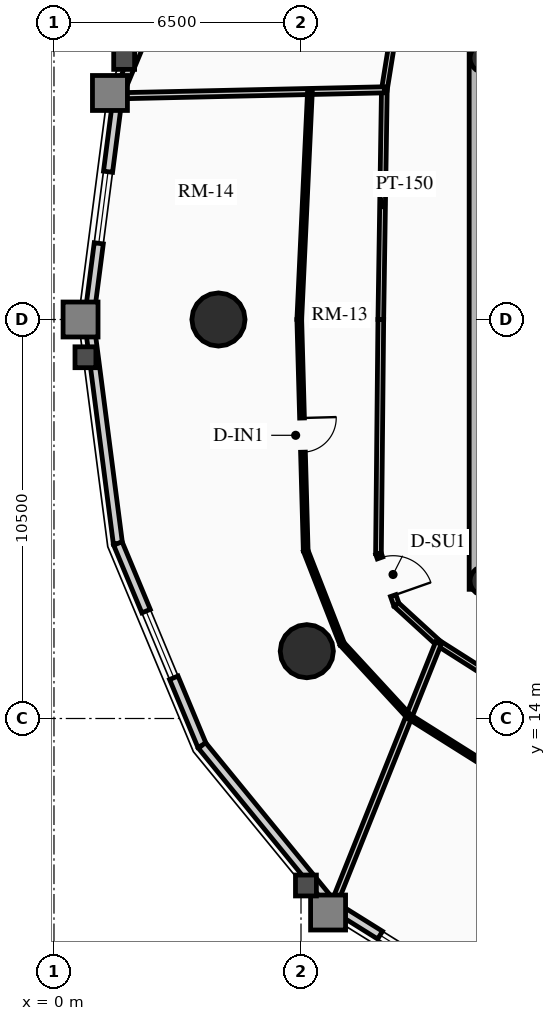
"""IFC4 building model, lengths in metres.
Left out: names, types, materials, properties, quantities, classifications, styles, units other than length and angle.
Written with IfcOpenShell. Run it as: python <this file> out.ifc"""

import sys

from ifc_helpers import new_model, si_unit, direction, frame, frame_2d, origin, origin_2d, place, context, subcontext, project, spatial, rectangle, circle, hollow_circle, extrude, source, transform, mapped, element, fill, save


model = new_model("IFC4")
c1 = context("Model", 3, precision=1e-05, world=origin(), true_north=direction((0.0, 1.0)))
c2 = subcontext(c1, "Body", "Model", "MODEL_VIEW")
j1 = project(units=[si_unit("LENGTHUNIT", "METRE"), si_unit("PLANEANGLEUNIT", "RADIAN")], contexts=[c1])
p1 = place(None, origin())
s1 = spatial("IfcSite", under=j1, at=p1, CompositionType="ELEMENT")
p2 = place(p1, origin())
s2 = spatial("IfcBuilding", under=s1, at=p2, CompositionType="ELEMENT")
p3 = place(p2, frame((0.0, 0.0, 110.89)))
s3 = spatial("IfcBuildingStorey", under=s2, at=p3, CompositionType="ELEMENT", Elevation=110.89)
p4 = place(p3, frame((11.15, 17.4, 0.0), z_axis=(0.0, 0.0, 1.0), x_axis=(0.0, 1.0, 0.0)))
e1 = element("IfcWall", 1, at=p4, inside=s3, PredefinedType="SHEAR", context=c2, shape_type="SweptSolid", body=[
    extrude(rectangle(XDim=14.2, YDim=0.45, at=frame_2d((7.1, 0.0))), origin(), (0.0, 0.0, 1.0), 2.91),
])
for number, where, z_axis, x_axis in (
    (2, (11.325, 17.62, 0.0), (0.0, 0.0, 1.0), (1.0, 0.0, 0.0)),
    (3, (11.325, 31.38, 0.0), (0.0, 0.0, 1.0), (1.0, 0.0, 0.0)),
):
    element("IfcColumn", number, at=place(p3, frame(where, z_axis=z_axis, x_axis=x_axis)), inside=s3, PredefinedType="COLUMN", context=c2, shape_type="SweptSolid", body=[
        extrude(hollow_circle(Radius=0.38, WallThickness=0.032, at=origin_2d()), origin(), (0.0, 0.0, 1.0), 2.91),
    ])
for number, where, z_axis, x_axis in (
    (4, (4.328, 24.5, 0.0), (0.0, 0.0, 1.0), (1.0, 0.0, 0.0)),
    (5, (6.653, 15.771, 0.0), (0.0, 0.0, 1.0), (1.0, 0.0, 0.0)),
):
    element("IfcColumn", number, at=place(p3, frame(where, z_axis=z_axis, x_axis=x_axis)), inside=s3, PredefinedType="USERDEFINED", context=c2, shape_type="SweptSolid", body=[
        extrude(circle(Radius=0.7, at=origin_2d()), origin(), (0.0, 0.0, 1.0), 2.91),
    ])
p5 = place(p3, frame((1.682, 30.393, 0.0), z_axis=(0.0, 0.0, 1.0), x_axis=(0.384344417632, 0.923189779317, 0.0)))
e6 = element("IfcWall", 6, at=p5, inside=s3, PredefinedType="SOLIDWALL", context=c2, shape_type="SweptSolid", body=[
    extrude(rectangle(XDim=5.758, YDim=0.24, at=frame_2d((2.879, 0.0))), origin(), (0.0, 0.0, 1.0), 2.179),
])
p6 = place(p3, frame((0.919, 24.5, 0.0), z_axis=(0.0, 0.0, 1.0), x_axis=(0.128351991996, 0.991728675672, 0.0)))
e7 = element("IfcWall", 7, at=p6, inside=s3, PredefinedType="SOLIDWALL", context=c2, shape_type="SweptSolid", body=[
    extrude(rectangle(XDim=5.942, YDim=0.24, at=frame_2d((2.971, 0.0))), origin(), (0.0, 0.0, 1.0), 2.179),
])
m1 = source(origin(), c2, "Body", "SweptSolid", [
    extrude(rectangle(XDim=1.9, YDim=1.35, at=frame_2d((0.95, 0.675))), frame((0.0, 0.13, 0.0), z_axis=(0.0, -1.0, 0.0), x_axis=(1.0, 0.0, 0.0)), (0.0, 0.0, 1.0), 0.26),
])
p7 = place(p6, frame((2.021, 0.0, 0.65)))
e8 = element("IfcOpeningElement", 8, at=p7, cuts=e7, PredefinedType="OPENING", context=c2, shape_type="MappedRepresentation", body=[
    mapped(m1, transform((0.0, 0.0, 0.0), x_axis=(1.0, 0.0, 0.0), y_axis=(0.0, 1.0, 0.0), z_axis=(0.0, 0.0, 1.0), scale=1.0)),
])
p8 = place(p3, frame((1.682, 18.607, 0.0), z_axis=(0.0, 0.0, 1.0), x_axis=(-0.128351991996, 0.991728675672, 0.0)))
e9 = element("IfcWall", 9, at=p8, inside=s3, PredefinedType="SOLIDWALL", context=c2, shape_type="SweptSolid", body=[
    extrude(rectangle(XDim=5.942, YDim=0.24, at=frame_2d((2.971, 0.0))), origin(), (0.0, 0.0, 1.0), 2.179),
])
p9 = place(p3, frame((3.895, 13.291, 0.0), z_axis=(0.0, 0.0, 1.0), x_axis=(-0.384344417632, 0.923189779317, 0.0)))
e10 = element("IfcWall", 10, at=p9, inside=s3, PredefinedType="SOLIDWALL", context=c2, shape_type="SweptSolid", body=[
    extrude(rectangle(XDim=5.758, YDim=0.24, at=frame_2d((2.879, 0.0))), origin(), (0.0, 0.0, 1.0), 2.179),
])
p10 = place(p9, frame((1.929, 0.0, 0.65)))
e11 = element("IfcOpeningElement", 11, at=p10, cuts=e10, PredefinedType="OPENING", context=c2, shape_type="MappedRepresentation", body=[
    mapped(m1, transform((0.0, 0.0, 0.0), x_axis=(1.0, 0.0, 0.0), y_axis=(0.0, 1.0, 0.0), z_axis=(0.0, 0.0, 1.0), scale=1.0)),
])
p11 = place(p3, frame((7.342, 9.072, 0.0), z_axis=(0.0, 0.0, 1.0), x_axis=(-0.632700781152, 0.77439635945, 0.0)))
e12 = element("IfcWall", 12, at=p11, inside=s3, PredefinedType="SOLIDWALL", context=c2, shape_type="SweptSolid", body=[
    extrude(rectangle(XDim=5.448, YDim=0.24, at=frame_2d((2.724, 0.0))), origin(), (0.0, 0.0, 1.0), 2.179),
])
p12 = place(p3, frame((11.685, 6.363, 0.0), z_axis=(0.0, 0.0, 1.0), x_axis=(-0.848520380187, 0.529162701263, 0.0)))
e13 = element("IfcWall", 13, at=p12, inside=s3, PredefinedType="SOLIDWALL", context=c2, shape_type="SweptSolid", body=[
    extrude(rectangle(XDim=5.119, YDim=0.24, at=frame_2d((2.56, 0.0))), origin(), (0.0, 0.0, 1.0), 2.179),
])
m2 = source(origin(), c2, "Body", "SweptSolid", [
    extrude(rectangle(XDim=2.2, YDim=1.35, at=frame_2d((1.1, 0.675))), frame((0.0, 0.13, 0.0), z_axis=(0.0, -1.0, 0.0), x_axis=(1.0, 0.0, 0.0)), (0.0, 0.0, 1.0), 0.26),
])
p13 = place(p12, frame((1.459, 0.0, 0.65)))
e14 = element("IfcOpeningElement", 14, at=p13, cuts=e13, PredefinedType="OPENING", context=c2, shape_type="MappedRepresentation", body=[
    mapped(m2, transform((0.0, 0.0, 0.0), x_axis=(1.0, 0.0, 0.0), y_axis=(0.0, 1.0, 0.0), z_axis=(0.0, 0.0, 1.0), scale=1.0)),
])
p14 = place(p3, frame((8.94, 32.078, 0.0), z_axis=(0.0, 0.0, 1.0), x_axis=(-0.159148467753, -0.98725466077, 0.0)))
e15 = element("IfcWall", 15, at=p14, inside=s3, PredefinedType="PARTITIONING", context=c2, shape_type="SweptSolid", body=[
    extrude(rectangle(XDim=1.554, YDim=0.15, at=frame_2d((0.777, 0.0))), origin(), (0.0, 0.0, 1.0), 2.225),
])
p15 = place(p3, frame((8.693, 30.544, 0.0), z_axis=(0.0, 0.0, 1.0), x_axis=(-0.015307007986, -0.99988284089, 0.0)))
e16 = element("IfcWall", 16, at=p15, inside=s3, PredefinedType="PARTITIONING", context=c2, shape_type="SweptSolid", body=[
    extrude(rectangle(XDim=6.045, YDim=0.15, at=frame_2d((3.022, 0.0))), origin(), (0.0, 0.0, 1.0), 2.655),
])
p16 = place(p3, frame((8.6, 24.5, 0.0), z_axis=(0.0, 0.0, 1.0), x_axis=(-0.010023665349, -0.999949761805, 0.0)))
e17 = element("IfcWall", 17, at=p16, inside=s3, PredefinedType="PARTITIONING", context=c2, shape_type="SweptSolid", body=[
    extrude(rectangle(XDim=6.162, YDim=0.15, at=frame_2d((3.081, 0.0))), origin(), (0.0, 0.0, 1.0), 2.225),
])
p17 = place(p3, frame((8.538, 18.338, 0.0), z_axis=(0.0, 0.0, 1.0), x_axis=(0.331358150167, -0.94350504838, 0.0)))
e18 = element("IfcWall", 18, at=p17, inside=s3, PredefinedType="PARTITIONING", context=c2, shape_type="SweptSolid", body=[
    extrude(rectangle(XDim=1.424, YDim=0.15, at=frame_2d((0.712, 0.0))), origin(), (0.0, 0.0, 1.0), 2.225),
])
m3 = source(origin(), c2, "Body", "SweptSolid", [
    extrude(rectangle(XDim=1.05, YDim=2.015, at=frame_2d((0.525, 1.007))), frame((0.0, 0.085, 0.0), z_axis=(0.0, -1.0, 0.0), x_axis=(1.0, 0.0, 0.0)), (0.0, 0.0, 1.0), 0.17),
])
p18 = place(p17, frame((0.12, 0.0, 0.0)))
e19 = element("IfcOpeningElement", 19, at=p18, cuts=e18, PredefinedType="OPENING", context=c2, shape_type="MappedRepresentation", body=[
    mapped(m3, transform((0.0, 0.0, 0.0), x_axis=(1.0, 0.0, 0.0), y_axis=(0.0, 1.0, 0.0), z_axis=(0.0, 0.0, 1.0), scale=1.0)),
])
p19 = place(p3, frame((9.01, 16.994, 0.0), z_axis=(0.0, 0.0, 1.0), x_axis=(0.737701798986, -0.67512669609, 0.0)))
e20 = element("IfcWall", 20, at=p19, inside=s3, PredefinedType="PARTITIONING", context=c2, shape_type="SweptSolid", body=[
    extrude(rectangle(XDim=1.498, YDim=0.15, at=frame_2d((0.749, 0.0))), origin(), (0.0, 0.0, 1.0), 2.225),
])
p20 = place(p3, frame((10.115, 15.983, 0.0), z_axis=(0.0, 0.0, 1.0), x_axis=(0.843995849351, -0.536349705209, 0.0)))
e21 = element("IfcWall", 21, at=p20, inside=s3, PredefinedType="PARTITIONING", context=c2, shape_type="SweptSolid", body=[
    extrude(rectangle(XDim=1.593, YDim=0.15, at=frame_2d((0.796, 0.0))), origin(), (0.0, 0.0, 1.0), 2.225),
])
p21 = place(p3, frame((8.693, 30.544, 0.0), z_axis=(0.0, 0.0, 1.0), x_axis=(-0.999746482141, -0.022516026432, 0.0)))
e22 = element("IfcWall", 22, at=p21, inside=s3, PredefinedType="PARTITIONING", context=c2, shape_type="SweptSolid", body=[
    extrude(rectangle(XDim=6.994, YDim=0.16, at=frame_2d((3.497, 0.0))), origin(), (0.0, 0.0, 1.0), 2.179),
])
p22 = place(p3, frame((10.115, 15.983, 0.0), z_axis=(0.0, 0.0, 1.0), x_axis=(-0.371861013147, -0.928288417951, 0.0)))
e23 = element("IfcWall", 23, at=p22, inside=s3, PredefinedType="PARTITIONING", context=c2, shape_type="SweptSolid", body=[
    extrude(rectangle(XDim=7.427, YDim=0.16, at=frame_2d((3.714, 0.0))), origin(), (0.0, 0.0, 1.0), 2.179),
])
p23 = place(p3, frame((6.735, 30.5, 0.0), z_axis=(0.0, 0.0, 1.0), x_axis=(-0.046620801603, -0.998912659274, 0.0)))
e24 = element("IfcWall", 24, at=p23, inside=s3, PredefinedType="PARTITIONING", context=c2, shape_type="SweptSolid", body=[
    extrude(rectangle(XDim=6.007, YDim=0.125, at=frame_2d((3.003, 0.0))), origin(), (0.0, 0.0, 1.0), 2.655),
])
p24 = place(p3, frame((6.455, 24.5, 0.0), z_axis=(0.0, 0.0, 1.0), x_axis=(0.027753708707, -0.999614791634, 0.0)))
e25 = element("IfcWall", 25, at=p24, inside=s3, PredefinedType="PARTITIONING", context=c2, shape_type="SweptSolid", body=[
    extrude(rectangle(XDim=6.087, YDim=0.125, at=frame_2d((3.044, 0.0))), origin(), (0.0, 0.0, 1.0), 2.225),
])
m4 = source(origin(), c2, "Body", "SweptSolid", [
    extrude(rectangle(XDim=0.9, YDim=2.005, at=frame_2d((0.45, 1.002))), frame((0.0, 0.073, 0.0), z_axis=(0.0, -1.0, 0.0), x_axis=(1.0, 0.0, 0.0)), (0.0, 0.0, 1.0), 0.145),
])
p25 = place(p24, frame((2.594, 0.0, 0.0)))
e26 = element("IfcOpeningElement", 26, at=p25, cuts=e25, PredefinedType="OPENING", context=c2, shape_type="MappedRepresentation", body=[
    mapped(m4, transform((0.0, 0.0, 0.0), x_axis=(1.0, 0.0, 0.0), y_axis=(0.0, 1.0, 0.0), z_axis=(0.0, 0.0, 1.0), scale=1.0)),
])
p26 = place(p3, frame((6.624, 18.415, 0.0), z_axis=(0.0, 0.0, 1.0), x_axis=(0.363854295337, -0.931455877519, 0.0)))
e27 = element("IfcWall", 27, at=p26, inside=s3, PredefinedType="PARTITIONING", context=c2, shape_type="SweptSolid", body=[
    extrude(rectangle(XDim=2.635, YDim=0.125, at=frame_2d((1.317, 0.0))), origin(), (0.0, 0.0, 1.0), 2.225),
])
p27 = place(p3, frame((7.583, 15.961, 0.0), z_axis=(0.0, 0.0, 1.0), x_axis=(0.677838563189, -0.735210774032, 0.0)))
e28 = element("IfcWall", 28, at=p27, inside=s3, PredefinedType="PARTITIONING", context=c2, shape_type="SweptSolid", body=[
    extrude(rectangle(XDim=2.596, YDim=0.125, at=frame_2d((1.298, 0.0))), origin(), (0.0, 0.0, 1.0), 2.655),
])
p28 = place(p3, frame((9.342, 14.052, 0.0), z_axis=(0.0, 0.0, 1.0), x_axis=(0.846526826244, -0.532346064557, 0.0)))
e29 = element("IfcWall", 29, at=p28, inside=s3, PredefinedType="PARTITIONING", context=c2, shape_type="SweptSolid", body=[
    extrude(rectangle(XDim=2.578, YDim=0.125, at=frame_2d((1.289, 0.0))), origin(), (0.0, 0.0, 1.0), 2.225),
])
m5 = source(origin(), c2, "Body", "SweptSolid", [
    extrude(rectangle(XDim=1.9, YDim=1.35, at=frame_2d((0.95, 0.675))), frame((0.0, 0.03, 0.0), z_axis=(0.0, -1.0, 0.0), x_axis=(1.0, 0.0, 0.0)), (0.0, 0.0, 1.0), 0.06),
])
p29 = place(p7, origin())
e30 = element("IfcWindow", 30, at=p29, inside=s3, PartitioningType="DOUBLE_PANEL_VERTICAL", PredefinedType="WINDOW", context=c2, shape_type="MappedRepresentation", body=[
    mapped(m5, transform((0.0, 0.0, 0.0), x_axis=(1.0, 0.0, 0.0), y_axis=(0.0, 1.0, 0.0), z_axis=(0.0, 0.0, 1.0), scale=1.0)),
])
fill(e8, e30)
p30 = place(p10, origin())
e31 = element("IfcWindow", 31, at=p30, inside=s3, PartitioningType="DOUBLE_PANEL_VERTICAL", PredefinedType="WINDOW", context=c2, shape_type="MappedRepresentation", body=[
    mapped(m5, transform((0.0, 0.0, 0.0), x_axis=(1.0, 0.0, 0.0), y_axis=(0.0, 1.0, 0.0), z_axis=(0.0, 0.0, 1.0), scale=1.0)),
])
fill(e11, e31)
m6 = source(origin(), c2, "Body", "SweptSolid", [
    extrude(rectangle(XDim=2.2, YDim=1.35, at=frame_2d((1.1, 0.675))), frame((0.0, 0.03, 0.0), z_axis=(0.0, -1.0, 0.0), x_axis=(1.0, 0.0, 0.0)), (0.0, 0.0, 1.0), 0.06),
])
p31 = place(p13, origin())
e32 = element("IfcWindow", 32, at=p31, inside=s3, PartitioningType="DOUBLE_PANEL_VERTICAL", PredefinedType="WINDOW", context=c2, shape_type="MappedRepresentation", body=[
    mapped(m6, transform((0.0, 0.0, 0.0), x_axis=(1.0, 0.0, 0.0), y_axis=(0.0, 1.0, 0.0), z_axis=(0.0, 0.0, 1.0), scale=1.0)),
])
fill(e14, e32)
m7 = source(origin(), c2, "Body", "SweptSolid", [
    extrude(rectangle(XDim=1.05, YDim=2.015, at=frame_2d((0.525, 1.007))), frame((0.0, 0.025, 0.0), z_axis=(0.0, -1.0, 0.0), x_axis=(1.0, 0.0, 0.0)), (0.0, 0.0, 1.0), 0.05),
])
p32 = place(p18, origin())
e33 = element("IfcDoor", 33, at=p32, inside=s3, OperationType="SINGLE_SWING_RIGHT", PredefinedType="DOOR", context=c2, shape_type="MappedRepresentation", body=[
    mapped(m7, transform((0.0, 0.0, 0.0), x_axis=(1.0, 0.0, 0.0), y_axis=(0.0, 1.0, 0.0), z_axis=(0.0, 0.0, 1.0), scale=1.0)),
])
fill(e19, e33)
m8 = source(origin(), c2, "Body", "SweptSolid", [
    extrude(rectangle(XDim=0.9, YDim=2.005, at=frame_2d((0.45, 1.002))), frame((0.0, 0.025, 0.0), z_axis=(0.0, -1.0, 0.0), x_axis=(1.0, 0.0, 0.0)), (0.0, 0.0, 1.0), 0.05),
])
p33 = place(p25, origin())
e34 = element("IfcDoor", 34, at=p33, inside=s3, OperationType="SINGLE_SWING_LEFT", PredefinedType="DOOR", context=c2, shape_type="MappedRepresentation", body=[
    mapped(m8, transform((0.0, 0.0, 0.0), x_axis=(1.0, 0.0, 0.0), y_axis=(0.0, 1.0, 0.0), z_axis=(0.0, 0.0, 1.0), scale=1.0)),
])
fill(e26, e34)
save(model, sys.argv[1])
